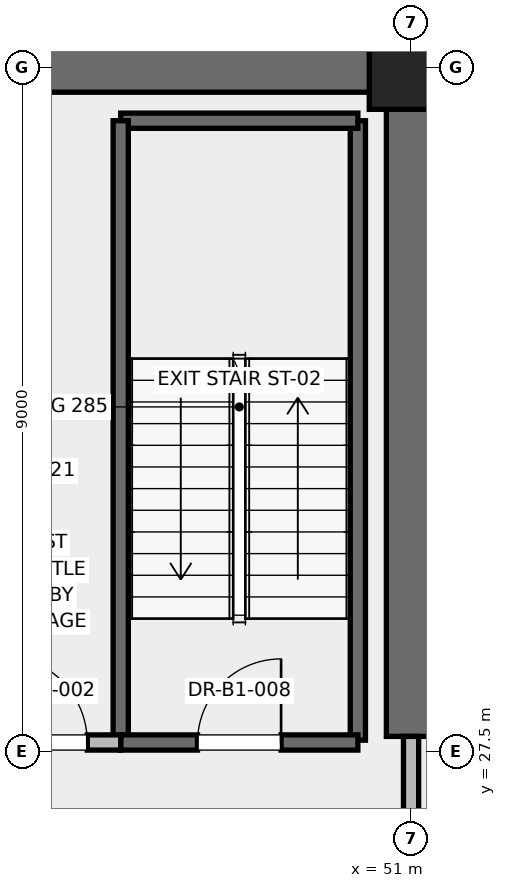
"""IFC4 building model, lengths in metres.
Left out: names, types, materials, properties, quantities, classifications, styles, units other than length and angle.
Written with IfcOpenShell. Run it as: python <this file> out.ifc"""

import sys

from ifc_helpers import new_model, si_unit, direction, frame, frame_2d, origin, origin_2d, place, context, subcontext, project, spatial, rectangle, extrude, element, fill, save


model = new_model("IFC4")
c1 = context("Model", 3, precision=1e-05, world=origin(), true_north=direction((0.0, 1.0)))
c2 = subcontext(c1, "Body", "Model", "MODEL_VIEW")
j1 = project(units=[si_unit("LENGTHUNIT", "METRE"), si_unit("PLANEANGLEUNIT", "RADIAN")], contexts=[c1])
p1 = place(None, origin())
s1 = spatial("IfcSite", under=j1, at=p1, CompositionType="ELEMENT")
p2 = place(p1, origin())
s2 = spatial("IfcBuilding", under=s1, at=p2, CompositionType="ELEMENT")
p3 = place(p2, frame((0.0, 0.0, -4.5)))
s3 = spatial("IfcBuildingStorey", under=s2, at=p3, CompositionType="ELEMENT", Elevation=-4.5)
p4 = place(p3, frame((51.0, 36.5, 0.0), z_axis=(0.0, 0.0, 1.0), x_axis=(1.0, 0.0, 0.0)))
e1 = element("IfcColumn", 1, at=p4, inside=s3, PredefinedType="PILASTER", context=c2, shape_type="SweptSolid", body=[
    extrude(rectangle(XDim=1.1, YDim=1.1, at=origin_2d()), origin(), (0.0, 0.0, 1.0), 4.5),
])
p5 = place(p3, frame((45.2, 36.5, 0.0), z_axis=(0.0, 0.0, 1.0), x_axis=(1.0, 0.0, 0.0)))
e2 = element("IfcWall", 2, at=p5, inside=s3, PredefinedType="SHEAR", context=c2, shape_type="SweptSolid", body=[
    extrude(rectangle(XDim=5.8, YDim=0.65, at=frame_2d((2.9, 0.0))), origin(), (0.0, 0.0, 1.0), 4.22),
])
p6 = place(p3, frame((51.0, 27.7, 0.0), z_axis=(0.0, 0.0, 1.0), x_axis=(0.0, 1.0, 0.0)))
e3 = element("IfcWall", 3, at=p6, inside=s3, PredefinedType="SHEAR", context=c2, shape_type="SweptSolid", body=[
    extrude(rectangle(XDim=8.8, YDim=0.65, at=frame_2d((4.4, 0.0))), origin(), (0.0, 0.0, 1.0), 4.22),
])
p7 = place(p3, frame((50.3, 27.65, 0.0), z_axis=(0.0, 0.0, 1.0), x_axis=(0.0, 1.0, 0.0)))
e4 = element("IfcWall", 4, at=p7, inside=s3, PredefinedType="SOLIDWALL", context=c2, shape_type="SweptSolid", body=[
    extrude(rectangle(XDim=8.15, YDim=0.2, at=frame_2d((4.075, 0.0))), origin(), (0.0, 0.0, 1.0), 4.22),
])
p8 = place(p3, frame((47.18, 35.8, 0.0), z_axis=(0.0, 0.0, 1.0), x_axis=(1.0, 0.0, 0.0)))
e5 = element("IfcWall", 5, at=p8, inside=s3, PredefinedType="SOLIDWALL", context=c2, shape_type="SweptSolid", body=[
    extrude(rectangle(XDim=3.12, YDim=0.2, at=frame_2d((1.56, 0.0))), origin(), (0.0, 0.0, 1.0), 4.22),
])
p9 = place(p3, frame((47.18, 27.62, 0.0), z_axis=(0.0, 0.0, 1.0), x_axis=(0.0, 1.0, 0.0)))
e6 = element("IfcWall", 6, at=p9, inside=s3, PredefinedType="SOLIDWALL", context=c2, shape_type="SweptSolid", body=[
    extrude(rectangle(XDim=8.18, YDim=0.2, at=frame_2d((4.09, 0.0))), origin(), (0.0, 0.0, 1.0), 4.22),
])
p10 = place(p3, frame((47.18, 27.62, 0.0), z_axis=(0.0, 0.0, 1.0), x_axis=(1.0, 0.0, 0.0)))
e7 = element("IfcWall", 7, at=p10, inside=s3, PredefinedType="SOLIDWALL", context=c2, shape_type="SweptSolid", body=[
    extrude(rectangle(XDim=3.12, YDim=0.2, at=frame_2d((1.56, 0.0))), origin(), (0.0, 0.0, 1.0), 4.22),
])
p11 = place(p10, frame((1.01, 0.0, 0.0)))
e8 = element("IfcOpeningElement", 8, at=p11, cuts=e7, PredefinedType="OPENING", context=c2, shape_type="SweptSolid", body=[
    extrude(rectangle(XDim=1.1, YDim=2.15, at=frame_2d((0.55, 1.075))), frame((0.0, 0.1, 0.0), z_axis=(0.0, -1.0, 0.0), x_axis=(1.0, 0.0, 0.0)), (0.0, 0.0, 1.0), 0.2),
])
p12 = place(p3, frame((45.15, 27.62, 0.0), z_axis=(0.0, 0.0, 1.0), x_axis=(1.0, 0.0, 0.0)))
e9 = element("IfcWall", 9, at=p12, inside=s3, PredefinedType="PARTITIONING", context=c2, shape_type="SweptSolid", body=[
    extrude(rectangle(XDim=2.03, YDim=0.2, at=frame_2d((1.015, 0.0))), origin(), (0.0, 0.0, 1.0), 4.22),
])
p13 = place(p12, frame((0.44, 0.0, 0.0)))
e10 = element("IfcOpeningElement", 10, at=p13, cuts=e9, PredefinedType="OPENING", context=c2, shape_type="SweptSolid", body=[
    extrude(rectangle(XDim=1.15, YDim=2.2, at=frame_2d((0.575, 1.1))), frame((0.0, 0.1, 0.0), z_axis=(0.0, -1.0, 0.0), x_axis=(1.0, 0.0, 0.0)), (0.0, 0.0, 1.0), 0.2),
])
p14 = place(p3, frame((51.0, 24.3, 0.0), z_axis=(0.0, 0.0, 1.0), x_axis=(0.0, 1.0, 0.0)))
e11 = element("IfcWall", 11, at=p14, inside=s3, PredefinedType="PARTITIONING", context=c2, shape_type="SweptSolid", body=[
    extrude(rectangle(XDim=3.4, YDim=0.2, at=frame_2d((1.7, 0.0))), origin(), (0.0, 0.0, 1.0), 3.0),
])
p15 = place(p14, frame((1.125, 0.0, 0.0)))
e12 = element("IfcOpeningElement", 12, at=p15, cuts=e11, PredefinedType="OPENING", context=c2, shape_type="SweptSolid", body=[
    extrude(rectangle(XDim=1.15, YDim=2.2, at=frame_2d((0.575, 1.1))), frame((0.0, 0.1, 0.0), z_axis=(0.0, -1.0, 0.0), x_axis=(1.0, 0.0, 0.0)), (0.0, 0.0, 1.0), 0.2),
])
p16 = place(p11, origin())
e13 = element("IfcDoor", 13, at=p16, inside=s3, OperationType="SINGLE_SWING_RIGHT", PredefinedType="DOOR", context=c2, shape_type="SweptSolid", body=[
    extrude(rectangle(XDim=1.1, YDim=2.15, at=frame_2d((0.55, 1.075))), frame((0.0, 0.025, 0.0), z_axis=(0.0, -1.0, 0.0), x_axis=(1.0, 0.0, 0.0)), (0.0, 0.0, 1.0), 0.05),
])
fill(e8, e13)
p17 = place(p13, origin())
e14 = element("IfcDoor", 14, at=p17, inside=s3, OperationType="SINGLE_SWING_LEFT", PredefinedType="DOOR", context=c2, shape_type="SweptSolid", body=[
    extrude(rectangle(XDim=1.15, YDim=2.2, at=frame_2d((0.575, 1.1))), frame((0.0, 0.025, 0.0), z_axis=(0.0, -1.0, 0.0), x_axis=(1.0, 0.0, 0.0)), (0.0, 0.0, 1.0), 0.05),
])
fill(e10, e14)
save(model, sys.argv[1])
